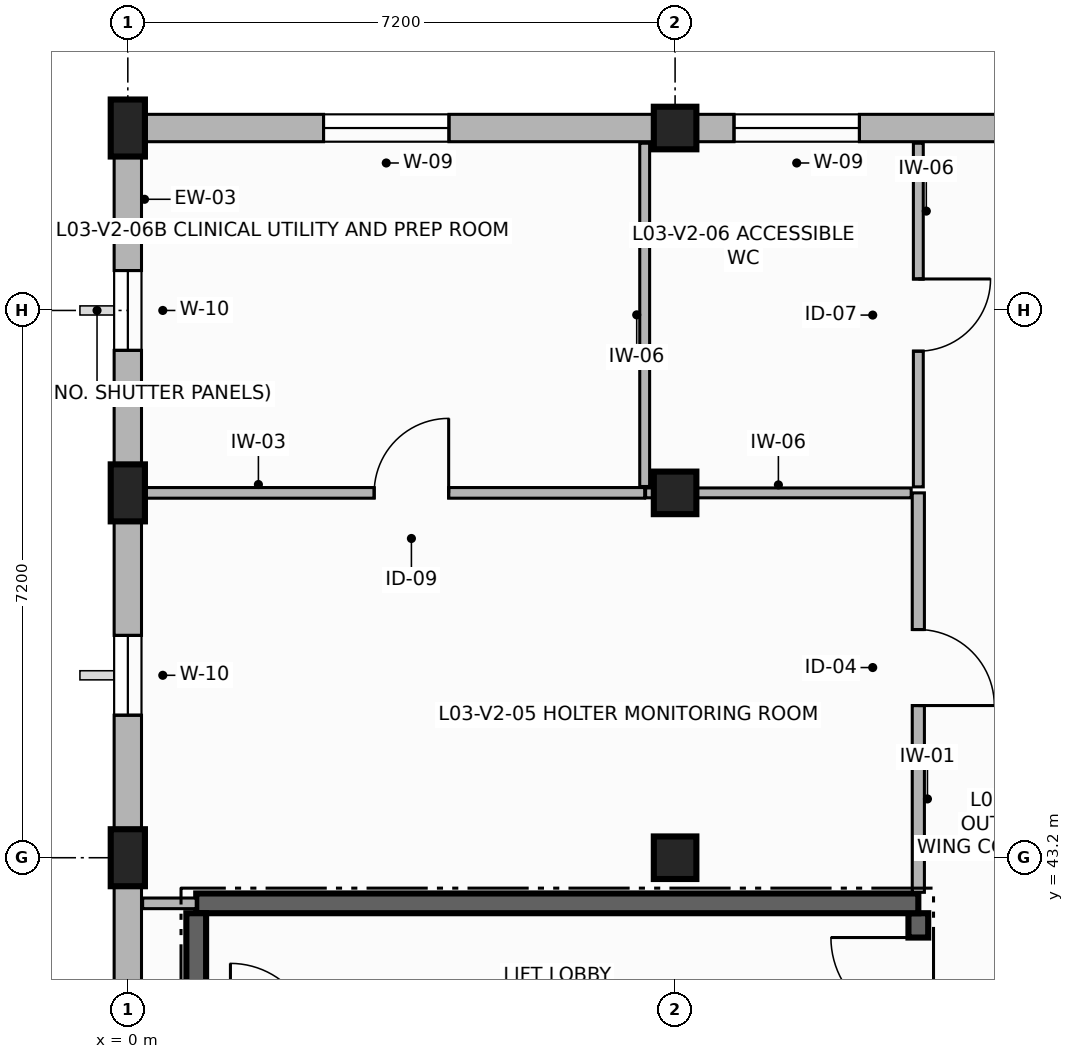
"""IFC4 building model, lengths in metres.
Left out: names, types, materials, properties, quantities, classifications, styles, units other than length and angle.
Written with IfcOpenShell. Run it as: python <this file> out.ifc"""

import sys

from ifc_helpers import new_model, si_unit, direction, frame, frame_2d, origin, origin_2d, place, context, subcontext, project, spatial, rectangle, extrude, element, fill, save


model = new_model("IFC4")
c1 = context("Model", 3, precision=1e-05, world=origin(), true_north=direction((0.0, 1.0)))
c2 = subcontext(c1, "Body", "Model", "MODEL_VIEW")
j1 = project(units=[si_unit("LENGTHUNIT", "METRE"), si_unit("PLANEANGLEUNIT", "RADIAN")], contexts=[c1])
p1 = place(None, origin())
s1 = spatial("IfcSite", under=j1, at=p1, CompositionType="ELEMENT")
p2 = place(p1, origin())
s2 = spatial("IfcBuilding", under=s1, at=p2, CompositionType="ELEMENT")
p3 = place(p2, frame((0.0, 0.0, 12.3)))
s3 = spatial("IfcBuildingStorey", under=s2, at=p3, CompositionType="ELEMENT", Elevation=12.3)
for number, where, z_axis, x_axis in (
    (1, (0.0, 43.2, 0.0), (0.0, 0.0, 1.0), (1.0, 0.0, 0.0)),
    (2, (0.0, 48.0, 0.0), (0.0, 0.0, 1.0), (1.0, 0.0, 0.0)),
    (3, (0.0, 52.8, 0.0), (0.0, 0.0, 1.0), (1.0, 0.0, 0.0)),
):
    element("IfcColumn", number, at=place(p3, frame(where, z_axis=z_axis, x_axis=x_axis)), inside=s3, PredefinedType="PILASTER", context=c2, shape_type="SweptSolid", body=[
        extrude(rectangle(XDim=0.45, YDim=0.75, at=origin_2d()), origin(), (0.0, 0.0, 1.0), 3.42),
    ])
for number, where, z_axis, x_axis in (
    (4, (7.2, 43.2, 0.0), (0.0, 0.0, 1.0), (1.0, 0.0, 0.0)),
    (5, (7.2, 48.0, 0.0), (0.0, 0.0, 1.0), (1.0, 0.0, 0.0)),
    (6, (7.2, 52.8, 0.0), (0.0, 0.0, 1.0), (1.0, 0.0, 0.0)),
):
    element("IfcColumn", number, at=place(p3, frame(where, z_axis=z_axis, x_axis=x_axis)), inside=s3, PredefinedType="COLUMN", context=c2, shape_type="SweptSolid", body=[
        extrude(rectangle(XDim=0.56, YDim=0.56, at=origin_2d()), origin(), (0.0, 0.0, 1.0), 3.42),
    ])
p4 = place(p3, frame((14.4, 52.8, 0.0), z_axis=(0.0, 0.0, 1.0), x_axis=(-1.0, 0.0, 0.0)))
e7 = element("IfcWall", 7, at=p4, inside=s3, PredefinedType="SOLIDWALL", context=c2, shape_type="SweptSolid", body=[
    extrude(rectangle(XDim=7.2, YDim=0.36, at=frame_2d((3.6, 0.0))), origin(), (0.0, 0.0, 1.0), 2.8),
])
p5 = place(p4, frame((4.775, 0.0, 0.85)))
e8 = element("IfcOpeningElement", 8, at=p5, cuts=e7, PredefinedType="OPENING", context=c2, shape_type="SweptSolid", body=[
    extrude(rectangle(XDim=1.65, YDim=1.75, at=frame_2d((0.825, 0.875))), frame((0.0, 0.19, 0.0), z_axis=(0.0, -1.0, 0.0), x_axis=(1.0, 0.0, 0.0)), (0.0, 0.0, 1.0), 0.38),
])
p6 = place(p3, frame((7.2, 52.8, 0.0), z_axis=(0.0, 0.0, 1.0), x_axis=(-1.0, 0.0, 0.0)))
e9 = element("IfcWall", 9, at=p6, inside=s3, PredefinedType="SOLIDWALL", context=c2, shape_type="SweptSolid", body=[
    extrude(rectangle(XDim=7.2, YDim=0.36, at=frame_2d((3.6, 0.0))), origin(), (0.0, 0.0, 1.0), 2.8),
])
p7 = place(p6, frame((2.975, 0.0, 0.85)))
e10 = element("IfcOpeningElement", 10, at=p7, cuts=e9, PredefinedType="OPENING", context=c2, shape_type="SweptSolid", body=[
    extrude(rectangle(XDim=1.65, YDim=1.75, at=frame_2d((0.825, 0.875))), frame((0.0, 0.19, 0.0), z_axis=(0.0, -1.0, 0.0), x_axis=(1.0, 0.0, 0.0)), (0.0, 0.0, 1.0), 0.38),
])
p8 = place(p3, frame((0.0, 52.8, 0.0), z_axis=(0.0, 0.0, 1.0), x_axis=(0.0, -1.0, 0.0)))
e11 = element("IfcWall", 11, at=p8, inside=s3, PredefinedType="SOLIDWALL", context=c2, shape_type="SweptSolid", body=[
    extrude(rectangle(XDim=4.8, YDim=0.36, at=frame_2d((2.4, 0.0))), origin(), (0.0, 0.0, 1.0), 2.8),
])
p9 = place(p8, frame((1.875, 0.0, 0.85)))
e12 = element("IfcOpeningElement", 12, at=p9, cuts=e11, PredefinedType="OPENING", context=c2, shape_type="SweptSolid", body=[
    extrude(rectangle(XDim=1.05, YDim=1.7, at=frame_2d((0.525, 0.85))), frame((0.0, 0.19, 0.0), z_axis=(0.0, -1.0, 0.0), x_axis=(1.0, 0.0, 0.0)), (0.0, 0.0, 1.0), 0.38),
])
p10 = place(p3, frame((0.0, 48.0, 0.0), z_axis=(0.0, 0.0, 1.0), x_axis=(0.0, -1.0, 0.0)))
e13 = element("IfcWall", 13, at=p10, inside=s3, PredefinedType="SOLIDWALL", context=c2, shape_type="SweptSolid", body=[
    extrude(rectangle(XDim=4.8, YDim=0.36, at=frame_2d((2.4, 0.0))), origin(), (0.0, 0.0, 1.0), 2.8),
])
p11 = place(p10, frame((1.875, 0.0, 0.85)))
e14 = element("IfcOpeningElement", 14, at=p11, cuts=e13, PredefinedType="OPENING", context=c2, shape_type="SweptSolid", body=[
    extrude(rectangle(XDim=1.05, YDim=1.7, at=frame_2d((0.525, 0.85))), frame((0.0, 0.19, 0.0), z_axis=(0.0, -1.0, 0.0), x_axis=(1.0, 0.0, 0.0)), (0.0, 0.0, 1.0), 0.38),
])
p12 = place(p3, frame((0.0, 43.2, 0.0), z_axis=(0.0, 0.0, 1.0), x_axis=(0.0, -1.0, 0.0)))
e15 = element("IfcWall", 15, at=p12, inside=s3, PredefinedType="SOLIDWALL", context=c2, shape_type="SweptSolid", body=[
    extrude(rectangle(XDim=7.2, YDim=0.36, at=frame_2d((3.6, 0.0))), origin(), (0.0, 0.0, 1.0), 2.8),
])
p13 = place(p12, frame((2.775, 0.0, 0.85)))
e16 = element("IfcOpeningElement", 16, at=p13, cuts=e15, PredefinedType="OPENING", context=c2, shape_type="SweptSolid", body=[
    extrude(rectangle(XDim=1.45, YDim=1.75, at=frame_2d((0.725, 0.875))), frame((0.0, 0.19, 0.0), z_axis=(0.0, -1.0, 0.0), x_axis=(1.0, 0.0, 0.0)), (0.0, 0.0, 1.0), 0.38),
])
p14 = place(p3, frame((10.4, 36.93, 0.0), z_axis=(0.0, 0.0, 1.0), x_axis=(0.0, 1.0, 0.0)))
e17 = element("IfcWall", 17, at=p14, inside=s3, PredefinedType="SHEAR", context=c2, shape_type="SweptSolid", body=[
    extrude(rectangle(XDim=5.54, YDim=0.26, at=frame_2d((2.77, 0.0))), origin(), (0.0, 0.0, 1.0), 3.42),
])
p15 = place(p14, frame((4.07, 0.0, 0.0)))
e18 = element("IfcOpeningElement", 18, at=p15, cuts=e17, PredefinedType="OPENING", context=c2, shape_type="SweptSolid", body=[
    extrude(rectangle(XDim=1.15, YDim=2.2, at=frame_2d((0.575, 1.1))), frame((0.0, 0.14, 0.0), z_axis=(0.0, -1.0, 0.0), x_axis=(1.0, 0.0, 0.0)), (0.0, 0.0, 1.0), 0.28),
])
p16 = place(p3, frame((10.4, 42.6, 0.0), z_axis=(0.0, 0.0, 1.0), x_axis=(-1.0, 0.0, 0.0)))
e19 = element("IfcWall", 19, at=p16, inside=s3, PredefinedType="SHEAR", context=c2, shape_type="SweptSolid", body=[
    extrude(rectangle(XDim=9.5, YDim=0.26, at=frame_2d((4.75, 0.0))), origin(), (0.0, 0.0, 1.0), 3.42),
])
p17 = place(p3, frame((0.9, 42.47, 0.0), z_axis=(0.0, 0.0, 1.0), x_axis=(0.0, -1.0, 0.0)))
e20 = element("IfcWall", 20, at=p17, inside=s3, PredefinedType="SHEAR", context=c2, shape_type="SweptSolid", body=[
    extrude(rectangle(XDim=5.54, YDim=0.26, at=frame_2d((2.77, 0.0))), origin(), (0.0, 0.0, 1.0), 3.42),
])
p18 = place(p3, frame((10.4, 48.0, 0.0), z_axis=(0.0, 0.0, 1.0), x_axis=(0.0, -1.0, 0.0)))
e21 = element("IfcWall", 21, at=p18, inside=s3, PredefinedType="PARTITIONING", context=c2, shape_type="SweptSolid", body=[
    extrude(rectangle(XDim=5.255, YDim=0.16, at=frame_2d((2.627, 0.0))), origin(), (0.0, 0.0, 1.0), 2.78),
])
p19 = place(p18, frame((1.798, 0.0, 0.0)))
e22 = element("IfcOpeningElement", 22, at=p19, cuts=e21, PredefinedType="OPENING", context=c2, shape_type="SweptSolid", body=[
    extrude(rectangle(XDim=1.0, YDim=2.15, at=frame_2d((0.5, 1.075))), frame((0.0, 0.09, 0.0), z_axis=(0.0, -1.0, 0.0), x_axis=(1.0, 0.0, 0.0)), (0.0, 0.0, 1.0), 0.18),
])
p20 = place(p3, frame((0.9, 42.6, 0.0), z_axis=(0.0, 0.0, 1.0), x_axis=(-1.0, 0.0, 0.0)))
e23 = element("IfcWall", 23, at=p20, inside=s3, PredefinedType="PARTITIONING", context=c2, shape_type="SweptSolid", body=[
    extrude(rectangle(XDim=0.705, YDim=0.14, at=frame_2d((0.353, 0.0))), origin(), (0.0, 0.0, 1.0), 2.78),
])
p21 = place(p3, frame((0.195, 48.0, 0.0), z_axis=(0.0, 0.0, 1.0), x_axis=(1.0, 0.0, 0.0)))
e24 = element("IfcWall", 24, at=p21, inside=s3, PredefinedType="PARTITIONING", context=c2, shape_type="SweptSolid", body=[
    extrude(rectangle(XDim=6.605, YDim=0.14, at=frame_2d((3.302, 0.0))), origin(), (0.0, 0.0, 1.0), 2.78),
])
p22 = place(p21, frame((3.046, 0.0, 0.0)))
e25 = element("IfcOpeningElement", 25, at=p22, cuts=e24, PredefinedType="OPENING", context=c2, shape_type="SweptSolid", body=[
    extrude(rectangle(XDim=0.98, YDim=2.15, at=frame_2d((0.49, 1.075))), frame((0.0, 0.08, 0.0), z_axis=(0.0, -1.0, 0.0), x_axis=(1.0, 0.0, 0.0)), (0.0, 0.0, 1.0), 0.16),
])
p23 = place(p3, frame((6.812, 48.0, 0.0), z_axis=(0.0, 0.0, 1.0), x_axis=(1.0, 0.0, 0.0)))
e26 = element("IfcWall", 26, at=p23, inside=s3, PredefinedType="PARTITIONING", context=c2, shape_type="SweptSolid", body=[
    extrude(rectangle(XDim=3.494, YDim=0.13, at=frame_2d((1.747, 0.0))), origin(), (0.0, 0.0, 1.0), 2.78),
])
p24 = place(p3, frame((6.8, 48.084, 0.0), z_axis=(0.0, 0.0, 1.0), x_axis=(0.0, 1.0, 0.0)))
e27 = element("IfcWall", 27, at=p24, inside=s3, PredefinedType="PARTITIONING", context=c2, shape_type="SweptSolid", body=[
    extrude(rectangle(XDim=4.516, YDim=0.13, at=frame_2d((2.258, 0.0))), origin(), (0.0, 0.0, 1.0), 2.78),
])
p25 = place(p3, frame((10.4, 52.6, 0.0), z_axis=(0.0, 0.0, 1.0), x_axis=(0.0, -1.0, 0.0)))
e28 = element("IfcWall", 28, at=p25, inside=s3, PredefinedType="PARTITIONING", context=c2, shape_type="SweptSolid", body=[
    extrude(rectangle(XDim=4.521, YDim=0.13, at=frame_2d((2.26, 0.0))), origin(), (0.0, 0.0, 1.0), 2.78),
])
p26 = place(p25, frame((1.786, 0.0, 0.0)))
e29 = element("IfcOpeningElement", 29, at=p26, cuts=e28, PredefinedType="OPENING", context=c2, shape_type="SweptSolid", body=[
    extrude(rectangle(XDim=0.95, YDim=2.1, at=frame_2d((0.475, 1.05))), frame((0.0, 0.075, 0.0), z_axis=(0.0, -1.0, 0.0), x_axis=(1.0, 0.0, 0.0)), (0.0, 0.0, 1.0), 0.15),
])
p27 = place(p5, origin())
e30 = element("IfcWindow", 30, at=p27, inside=s3, PartitioningType="SINGLE_PANEL", PredefinedType="WINDOW", context=c2, shape_type="SweptSolid", body=[
    extrude(rectangle(XDim=1.65, YDim=1.75, at=frame_2d((0.825, 0.875))), frame((0.0, 0.03, 0.0), z_axis=(0.0, -1.0, 0.0), x_axis=(1.0, 0.0, 0.0)), (0.0, 0.0, 1.0), 0.06),
])
fill(e8, e30)
p28 = place(p7, origin())
e31 = element("IfcWindow", 31, at=p28, inside=s3, PartitioningType="SINGLE_PANEL", PredefinedType="WINDOW", context=c2, shape_type="SweptSolid", body=[
    extrude(rectangle(XDim=1.65, YDim=1.75, at=frame_2d((0.825, 0.875))), frame((0.0, 0.03, 0.0), z_axis=(0.0, -1.0, 0.0), x_axis=(1.0, 0.0, 0.0)), (0.0, 0.0, 1.0), 0.06),
])
fill(e10, e31)
p29 = place(p9, origin())
e32 = element("IfcWindow", 32, at=p29, inside=s3, PartitioningType="SINGLE_PANEL", PredefinedType="WINDOW", context=c2, shape_type="SweptSolid", body=[
    extrude(rectangle(XDim=1.05, YDim=1.7, at=frame_2d((0.525, 0.85))), frame((0.0, 0.03, 0.0), z_axis=(0.0, -1.0, 0.0), x_axis=(1.0, 0.0, 0.0)), (0.0, 0.0, 1.0), 0.06),
])
fill(e12, e32)
p30 = place(p11, origin())
e33 = element("IfcWindow", 33, at=p30, inside=s3, PartitioningType="SINGLE_PANEL", PredefinedType="WINDOW", context=c2, shape_type="SweptSolid", body=[
    extrude(rectangle(XDim=1.05, YDim=1.7, at=frame_2d((0.525, 0.85))), frame((0.0, 0.03, 0.0), z_axis=(0.0, -1.0, 0.0), x_axis=(1.0, 0.0, 0.0)), (0.0, 0.0, 1.0), 0.06),
])
fill(e14, e33)
p31 = place(p15, origin())
e34 = element("IfcDoor", 34, at=p31, inside=s3, OperationType="SINGLE_SWING_RIGHT", PredefinedType="DOOR", context=c2, shape_type="SweptSolid", body=[
    extrude(rectangle(XDim=1.15, YDim=2.2, at=frame_2d((0.575, 1.1))), frame((0.0, 0.025, 0.0), z_axis=(0.0, -1.0, 0.0), x_axis=(1.0, 0.0, 0.0)), (0.0, 0.0, 1.0), 0.05),
])
fill(e18, e34)
p32 = place(p19, origin())
e35 = element("IfcDoor", 35, at=p32, inside=s3, OperationType="SINGLE_SWING_RIGHT", PredefinedType="DOOR", context=c2, shape_type="SweptSolid", body=[
    extrude(rectangle(XDim=1.0, YDim=2.15, at=frame_2d((0.5, 1.075))), frame((0.0, 0.025, 0.0), z_axis=(0.0, -1.0, 0.0), x_axis=(1.0, 0.0, 0.0)), (0.0, 0.0, 1.0), 0.05),
])
fill(e22, e35)
p33 = place(p26, origin())
e36 = element("IfcDoor", 36, at=p33, inside=s3, OperationType="SINGLE_SWING_LEFT", PredefinedType="DOOR", context=c2, shape_type="SweptSolid", body=[
    extrude(rectangle(XDim=0.95, YDim=2.1, at=frame_2d((0.475, 1.05))), frame((0.0, 0.025, 0.0), z_axis=(0.0, -1.0, 0.0), x_axis=(1.0, 0.0, 0.0)), (0.0, 0.0, 1.0), 0.05),
])
fill(e29, e36)
p34 = place(p22, origin())
e37 = element("IfcDoor", 37, at=p34, inside=s3, OperationType="SINGLE_SWING_RIGHT", PredefinedType="DOOR", context=c2, shape_type="SweptSolid", body=[
    extrude(rectangle(XDim=0.98, YDim=2.15, at=frame_2d((0.49, 1.075))), frame((0.0, 0.025, 0.0), z_axis=(0.0, -1.0, 0.0), x_axis=(1.0, 0.0, 0.0)), (0.0, 0.0, 1.0), 0.05),
])
fill(e25, e37)
save(model, sys.argv[1])
